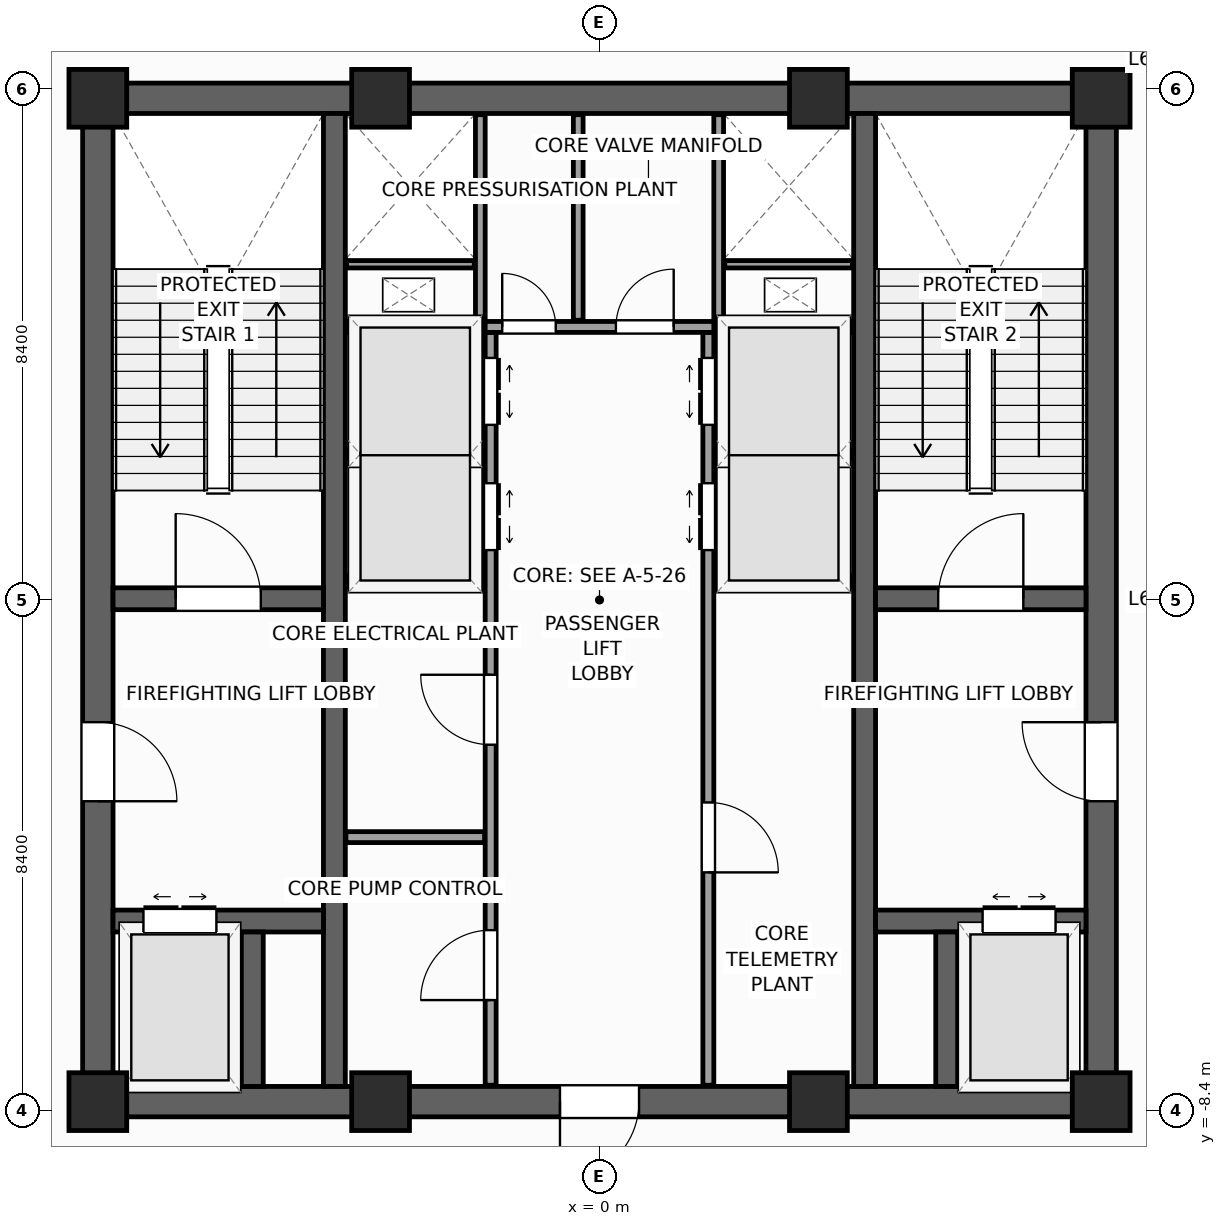
"""IFC4 building model, lengths in metres.
Left out: names, types, materials, properties, quantities, classifications, styles, units other than length and angle.
Written with IfcOpenShell. Run it as: python <this file> out.ifc"""

import sys

from ifc_helpers import new_model, si_unit, direction, frame, frame_2d, origin, origin_2d, place, context, subcontext, project, spatial, rectangle, extrude, source, transform, mapped, element, fill, save


model = new_model("IFC4")
c1 = context("Model", 3, precision=1e-05, world=origin(), true_north=direction((0.0, 1.0)))
c2 = subcontext(c1, "Body", "Model", "MODEL_VIEW")
j1 = project(units=[si_unit("LENGTHUNIT", "METRE"), si_unit("PLANEANGLEUNIT", "RADIAN")], contexts=[c1])
p1 = place(None, origin())
s1 = spatial("IfcSite", under=j1, at=p1, CompositionType="ELEMENT")
p2 = place(p1, origin())
s2 = spatial("IfcBuilding", under=s1, at=p2, CompositionType="ELEMENT")
p3 = place(p2, frame((0.0, 0.0, 260.2)))
s3 = spatial("IfcBuildingStorey", under=s2, at=p3, CompositionType="ELEMENT", Elevation=260.2)
p4 = place(p3, frame((-8.5, -8.25, 0.0), z_axis=(0.0, 0.0, 1.0), x_axis=(1.0, 0.0, 0.0)))
e1 = element("IfcWall", 1, at=p4, inside=s3, PredefinedType="SHEAR", context=c2, shape_type="SweptSolid", body=[
    extrude(rectangle(XDim=17.0, YDim=0.5, at=frame_2d((8.5, 0.0))), origin(), (0.0, 0.0, 1.0), 5.0),
])
p5 = place(p4, frame((7.85, 0.0, 0.0)))
e2 = element("IfcOpeningElement", 2, at=p5, cuts=e1, PredefinedType="OPENING", context=c2, shape_type="SweptSolid", body=[
    extrude(rectangle(XDim=1.3, YDim=2.2, at=frame_2d((0.65, 1.1))), frame((0.0, 0.26, 0.0), z_axis=(0.0, -1.0, 0.0), x_axis=(1.0, 0.0, 0.0)), (0.0, 0.0, 1.0), 0.52),
])
p6 = place(p3, frame((-8.5, 8.25, 0.0), z_axis=(0.0, 0.0, 1.0), x_axis=(1.0, 0.0, 0.0)))
e3 = element("IfcWall", 3, at=p6, inside=s3, PredefinedType="SHEAR", context=c2, shape_type="SweptSolid", body=[
    extrude(rectangle(XDim=17.0, YDim=0.5, at=frame_2d((8.5, 0.0))), origin(), (0.0, 0.0, 1.0), 5.0),
])
p7 = place(p3, frame((-8.25, -8.0, 0.0), z_axis=(0.0, 0.0, 1.0), x_axis=(0.0, 1.0, 0.0)))
e4 = element("IfcWall", 4, at=p7, inside=s3, PredefinedType="SHEAR", context=c2, shape_type="SweptSolid", body=[
    extrude(rectangle(XDim=16.0, YDim=0.5, at=frame_2d((8.0, 0.0))), origin(), (0.0, 0.0, 1.0), 5.0),
])
p8 = place(p7, frame((4.69, 0.0, 0.0)))
e5 = element("IfcOpeningElement", 5, at=p8, cuts=e4, PredefinedType="OPENING", context=c2, shape_type="SweptSolid", body=[
    extrude(rectangle(XDim=1.3, YDim=2.2, at=frame_2d((0.65, 1.1))), frame((0.0, 0.26, 0.0), z_axis=(0.0, -1.0, 0.0), x_axis=(1.0, 0.0, 0.0)), (0.0, 0.0, 1.0), 0.52),
])
p9 = place(p3, frame((8.25, -8.0, 0.0), z_axis=(0.0, 0.0, 1.0), x_axis=(0.0, 1.0, 0.0)))
e6 = element("IfcWall", 6, at=p9, inside=s3, PredefinedType="SHEAR", context=c2, shape_type="SweptSolid", body=[
    extrude(rectangle(XDim=16.0, YDim=0.5, at=frame_2d((8.0, 0.0))), origin(), (0.0, 0.0, 1.0), 5.0),
])
p10 = place(p9, frame((4.69, 0.0, 0.0)))
e7 = element("IfcOpeningElement", 7, at=p10, cuts=e6, PredefinedType="OPENING", context=c2, shape_type="SweptSolid", body=[
    extrude(rectangle(XDim=1.3, YDim=2.2, at=frame_2d((0.65, 1.1))), frame((0.0, 0.26, 0.0), z_axis=(0.0, -1.0, 0.0), x_axis=(1.0, 0.0, 0.0)), (0.0, 0.0, 1.0), 0.52),
])
for number, where, z_axis, x_axis in (
    (8, (-4.36, -8.0, 0.0), (0.0, 0.0, 1.0), (0.0, 1.0, 0.0)),
    (9, (4.36, -8.0, 0.0), (0.0, 0.0, 1.0), (0.0, 1.0, 0.0)),
):
    element("IfcWall", number, at=place(p3, frame(where, z_axis=z_axis, x_axis=x_axis)), inside=s3, PredefinedType="SHEAR", context=c2, shape_type="SweptSolid", body=[
        extrude(rectangle(XDim=16.0, YDim=0.36, at=frame_2d((8.0, 0.0))), origin(), (0.0, 0.0, 1.0), 5.0),
    ])
p11 = place(p3, frame((-8.0, 0.02, 0.0), z_axis=(0.0, 0.0, 1.0), x_axis=(1.0, 0.0, 0.0)))
e10 = element("IfcWall", 10, at=p11, inside=s3, PredefinedType="SHEAR", context=c2, shape_type="SweptSolid", body=[
    extrude(rectangle(XDim=3.46, YDim=0.36, at=frame_2d((1.73, 0.0))), origin(), (0.0, 0.0, 1.0), 5.0),
])
p12 = place(p11, frame((1.03, 0.0, 0.0)))
e11 = element("IfcOpeningElement", 11, at=p12, cuts=e10, PredefinedType="OPENING", context=c2, shape_type="SweptSolid", body=[
    extrude(rectangle(XDim=1.4, YDim=2.2, at=frame_2d((0.7, 1.1))), frame((0.0, 0.19, 0.0), z_axis=(0.0, -1.0, 0.0), x_axis=(1.0, 0.0, 0.0)), (0.0, 0.0, 1.0), 0.38),
])
p13 = place(p3, frame((4.54, 0.02, 0.0), z_axis=(0.0, 0.0, 1.0), x_axis=(1.0, 0.0, 0.0)))
e12 = element("IfcWall", 12, at=p13, inside=s3, PredefinedType="SHEAR", context=c2, shape_type="SweptSolid", body=[
    extrude(rectangle(XDim=3.46, YDim=0.36, at=frame_2d((1.73, 0.0))), origin(), (0.0, 0.0, 1.0), 5.0),
])
p14 = place(p13, frame((1.03, 0.0, 0.0)))
e13 = element("IfcOpeningElement", 13, at=p14, cuts=e12, PredefinedType="OPENING", context=c2, shape_type="SweptSolid", body=[
    extrude(rectangle(XDim=1.4, YDim=2.2, at=frame_2d((0.7, 1.1))), frame((0.0, 0.19, 0.0), z_axis=(0.0, -1.0, 0.0), x_axis=(1.0, 0.0, 0.0)), (0.0, 0.0, 1.0), 0.38),
])
p15 = place(p3, frame((-8.0, -5.28, 0.0), z_axis=(0.0, 0.0, 1.0), x_axis=(1.0, 0.0, 0.0)))
e14 = element("IfcWall", 14, at=p15, inside=s3, PredefinedType="SHEAR", context=c2, shape_type="SweptSolid", body=[
    extrude(rectangle(XDim=3.46, YDim=0.36, at=frame_2d((1.73, 0.0))), origin(), (0.0, 0.0, 1.0), 5.0),
])
p16 = place(p15, frame((0.5, 0.0, 0.0)))
e15 = element("IfcOpeningElement", 15, at=p16, cuts=e14, PredefinedType="OPENING", context=c2, shape_type="SweptSolid", body=[
    extrude(rectangle(XDim=1.2, YDim=2.25, at=frame_2d((0.6, 1.125))), frame((0.0, 0.19, 0.0), z_axis=(0.0, -1.0, 0.0), x_axis=(1.0, 0.0, 0.0)), (0.0, 0.0, 1.0), 0.38),
])
p17 = place(p3, frame((4.54, -5.28, 0.0), z_axis=(0.0, 0.0, 1.0), x_axis=(1.0, 0.0, 0.0)))
e16 = element("IfcWall", 16, at=p17, inside=s3, PredefinedType="SHEAR", context=c2, shape_type="SweptSolid", body=[
    extrude(rectangle(XDim=3.46, YDim=0.36, at=frame_2d((1.73, 0.0))), origin(), (0.0, 0.0, 1.0), 5.0),
])
p18 = place(p17, frame((1.76, 0.0, 0.0)))
e17 = element("IfcOpeningElement", 17, at=p18, cuts=e16, PredefinedType="OPENING", context=c2, shape_type="SweptSolid", body=[
    extrude(rectangle(XDim=1.2, YDim=2.25, at=frame_2d((0.6, 1.125))), frame((0.0, 0.19, 0.0), z_axis=(0.0, -1.0, 0.0), x_axis=(1.0, 0.0, 0.0)), (0.0, 0.0, 1.0), 0.38),
])
for number, where, z_axis, x_axis in (
    (18, (-5.71, -8.0, 0.0), (0.0, 0.0, 1.0), (0.0, 1.0, 0.0)),
    (19, (5.71, -8.0, 0.0), (0.0, 0.0, 1.0), (0.0, 1.0, 0.0)),
):
    element("IfcWall", number, at=place(p3, frame(where, z_axis=z_axis, x_axis=x_axis)), inside=s3, PredefinedType="SHEAR", context=c2, shape_type="SweptSolid", body=[
        extrude(rectangle(XDim=2.54, YDim=0.36, at=frame_2d((1.27, 0.0))), origin(), (0.0, 0.0, 1.0), 5.0),
    ])
m1 = source(origin(), c2, "Body", "SweptSolid", [
    extrude(rectangle(XDim=0.95, YDim=0.95, at=origin_2d()), origin(), (0.0, 0.0, 1.0), 5.0),
])
for number, where, z_axis, x_axis in (
    (20, (-8.25, -8.25, 0.0), (0.0, 0.0, 1.0), (1.0, 0.0, 0.0)),
    (21, (8.25, -8.25, 0.0), (0.0, 0.0, 1.0), (1.0, 0.0, 0.0)),
    (22, (8.25, 8.25, 0.0), (0.0, 0.0, 1.0), (1.0, 0.0, 0.0)),
    (23, (-8.25, 8.25, 0.0), (0.0, 0.0, 1.0), (1.0, 0.0, 0.0)),
    (24, (-3.6, -8.25, 0.0), (0.0, 0.0, 1.0), (1.0, 0.0, 0.0)),
    (25, (3.6, -8.25, 0.0), (0.0, 0.0, 1.0), (1.0, 0.0, 0.0)),
    (26, (-3.6, 8.25, 0.0), (0.0, 0.0, 1.0), (1.0, 0.0, 0.0)),
    (27, (3.6, 8.25, 0.0), (0.0, 0.0, 1.0), (1.0, 0.0, 0.0)),
):
    element("IfcColumn", number, at=place(p3, frame(where, z_axis=z_axis, x_axis=x_axis)), inside=s3, PredefinedType="PILASTER", context=c2, shape_type="MappedRepresentation", body=[
        mapped(m1, transform((0.0, 0.0, 0.0), scale=1.0)),
    ])
p19 = place(p3, frame((-1.79, -7.98, 0.0), z_axis=(0.0, 0.0, 1.0), x_axis=(0.0, 1.0, 0.0)))
e28 = element("IfcWall", 28, at=p19, inside=s3, PredefinedType="PARTITIONING", context=c2, shape_type="SweptSolid", body=[
    extrude(rectangle(XDim=12.38, YDim=0.18, at=frame_2d((6.19, 0.0))), origin(), (0.0, 0.0, 1.0), 4.75),
])
p20 = place(p19, frame((8.8, 0.0, 0.0)))
e29 = element("IfcOpeningElement", 29, at=p20, cuts=e28, PredefinedType="OPENING", context=c2, shape_type="SweptSolid", body=[
    extrude(rectangle(XDim=1.1, YDim=2.2, at=frame_2d((0.55, 1.1))), frame((0.0, 0.1, 0.0), z_axis=(0.0, -1.0, 0.0), x_axis=(1.0, 0.0, 0.0)), (0.0, 0.0, 1.0), 0.2),
])
p21 = place(p19, frame((10.86, 0.0, 0.0)))
e30 = element("IfcOpeningElement", 30, at=p21, cuts=e28, PredefinedType="OPENING", context=c2, shape_type="SweptSolid", body=[
    extrude(rectangle(XDim=1.1, YDim=2.2, at=frame_2d((0.55, 1.1))), frame((0.0, 0.1, 0.0), z_axis=(0.0, -1.0, 0.0), x_axis=(1.0, 0.0, 0.0)), (0.0, 0.0, 1.0), 0.2),
])
p22 = place(p19, frame((1.4, 0.0, 0.0)))
e31 = element("IfcOpeningElement", 31, at=p22, cuts=e28, PredefinedType="OPENING", context=c2, shape_type="SweptSolid", body=[
    extrude(rectangle(XDim=1.15, YDim=2.25, at=frame_2d((0.575, 1.125))), frame((0.0, 0.1, 0.0), z_axis=(0.0, -1.0, 0.0), x_axis=(1.0, 0.0, 0.0)), (0.0, 0.0, 1.0), 0.2),
])
p23 = place(p19, frame((5.6, 0.0, 0.0)))
e32 = element("IfcOpeningElement", 32, at=p23, cuts=e28, PredefinedType="OPENING", context=c2, shape_type="SweptSolid", body=[
    extrude(rectangle(XDim=1.15, YDim=2.25, at=frame_2d((0.575, 1.125))), frame((0.0, 0.1, 0.0), z_axis=(0.0, -1.0, 0.0), x_axis=(1.0, 0.0, 0.0)), (0.0, 0.0, 1.0), 0.2),
])
p24 = place(p3, frame((1.79, -7.98, 0.0), z_axis=(0.0, 0.0, 1.0), x_axis=(0.0, 1.0, 0.0)))
e33 = element("IfcWall", 33, at=p24, inside=s3, PredefinedType="PARTITIONING", context=c2, shape_type="SweptSolid", body=[
    extrude(rectangle(XDim=12.38, YDim=0.18, at=frame_2d((6.19, 0.0))), origin(), (0.0, 0.0, 1.0), 4.75),
])
p25 = place(p24, frame((8.8, 0.0, 0.0)))
e34 = element("IfcOpeningElement", 34, at=p25, cuts=e33, PredefinedType="OPENING", context=c2, shape_type="SweptSolid", body=[
    extrude(rectangle(XDim=1.1, YDim=2.2, at=frame_2d((0.55, 1.1))), frame((0.0, 0.1, 0.0), z_axis=(0.0, -1.0, 0.0), x_axis=(1.0, 0.0, 0.0)), (0.0, 0.0, 1.0), 0.2),
])
p26 = place(p24, frame((10.86, 0.0, 0.0)))
e35 = element("IfcOpeningElement", 35, at=p26, cuts=e33, PredefinedType="OPENING", context=c2, shape_type="SweptSolid", body=[
    extrude(rectangle(XDim=1.1, YDim=2.2, at=frame_2d((0.55, 1.1))), frame((0.0, 0.1, 0.0), z_axis=(0.0, -1.0, 0.0), x_axis=(1.0, 0.0, 0.0)), (0.0, 0.0, 1.0), 0.2),
])
p27 = place(p24, frame((3.5, 0.0, 0.0)))
e36 = element("IfcOpeningElement", 36, at=p27, cuts=e33, PredefinedType="OPENING", context=c2, shape_type="SweptSolid", body=[
    extrude(rectangle(XDim=1.15, YDim=2.25, at=frame_2d((0.575, 1.125))), frame((0.0, 0.1, 0.0), z_axis=(0.0, -1.0, 0.0), x_axis=(1.0, 0.0, 0.0)), (0.0, 0.0, 1.0), 0.2),
])
p28 = place(p3, frame((-1.88, 4.49, 0.0), z_axis=(0.0, 0.0, 1.0), x_axis=(1.0, 0.0, 0.0)))
e37 = element("IfcWall", 37, at=p28, inside=s3, PredefinedType="PARTITIONING", context=c2, shape_type="SweptSolid", body=[
    extrude(rectangle(XDim=3.76, YDim=0.18, at=frame_2d((1.88, 0.0))), origin(), (0.0, 0.0, 1.0), 4.75),
])
p29 = place(p28, frame((0.28, 0.0, 0.0)))
e38 = element("IfcOpeningElement", 38, at=p29, cuts=e37, PredefinedType="OPENING", context=c2, shape_type="SweptSolid", body=[
    extrude(rectangle(XDim=0.88, YDim=2.1, at=frame_2d((0.44, 1.05))), frame((0.0, 0.1, 0.0), z_axis=(0.0, -1.0, 0.0), x_axis=(1.0, 0.0, 0.0)), (0.0, 0.0, 1.0), 0.2),
])
p30 = place(p28, frame((2.15, 0.0, 0.0)))
e39 = element("IfcOpeningElement", 39, at=p30, cuts=e37, PredefinedType="OPENING", context=c2, shape_type="SweptSolid", body=[
    extrude(rectangle(XDim=0.95, YDim=2.1, at=frame_2d((0.475, 1.05))), frame((0.0, 0.1, 0.0), z_axis=(0.0, -1.0, 0.0), x_axis=(1.0, 0.0, 0.0)), (0.0, 0.0, 1.0), 0.2),
])
for number, where, z_axis, x_axis in (
    (40, (-4.17, -3.9, 0.0), (0.0, 0.0, 1.0), (1.0, 0.0, 0.0)),
    (41, (-4.17, 0.3, 0.0), (0.0, 0.0, 1.0), (1.0, 0.0, 0.0)),
    (42, (1.89, 0.3, 0.0), (0.0, 0.0, 1.0), (1.0, 0.0, 0.0)),
    (43, (-4.17, 4.49, 0.0), (0.0, 0.0, 1.0), (1.0, 0.0, 0.0)),
    (44, (1.89, 4.49, 0.0), (0.0, 0.0, 1.0), (1.0, 0.0, 0.0)),
):
    element("IfcWall", number, at=place(p3, frame(where, z_axis=z_axis, x_axis=x_axis)), inside=s3, PredefinedType="PARTITIONING", context=c2, shape_type="SweptSolid", body=[
        extrude(rectangle(XDim=2.28, YDim=0.18, at=frame_2d((1.14, 0.0))), origin(), (0.0, 0.0, 1.0), 4.75),
    ])
for number, where, z_axis, x_axis in (
    (45, (-4.16, 2.4, 0.0), (0.0, 0.0, 1.0), (1.0, 0.0, 0.0)),
    (46, (1.9, 2.4, 0.0), (0.0, 0.0, 1.0), (1.0, 0.0, 0.0)),
):
    element("IfcWall", number, at=place(p3, frame(where, z_axis=z_axis, x_axis=x_axis)), inside=s3, PredefinedType="PARTITIONING", context=c2, shape_type="SweptSolid", body=[
        extrude(rectangle(XDim=2.26, YDim=0.12, at=frame_2d((1.13, 0.0))), origin(), (0.0, 0.0, 1.0), 4.75),
    ])
for number, where, z_axis, x_axis in (
    (47, (-1.96, 4.58, 0.0), (0.0, 0.0, 1.0), (0.0, 1.0, 0.0)),
    (48, (1.96, 4.58, 0.0), (0.0, 0.0, 1.0), (0.0, 1.0, 0.0)),
):
    element("IfcWall", number, at=place(p3, frame(where, z_axis=z_axis, x_axis=x_axis)), inside=s3, PredefinedType="PARTITIONING", context=c2, shape_type="SweptSolid", body=[
        extrude(rectangle(XDim=3.4, YDim=0.16, at=frame_2d((1.7, 0.0))), origin(), (0.0, 0.0, 1.0), 4.75),
    ])
for number, where, z_axis, x_axis in (
    (49, (-4.16, 5.52, 0.0), (0.0, 0.0, 1.0), (1.0, 0.0, 0.0)),
    (50, (2.06, 5.52, 0.0), (0.0, 0.0, 1.0), (1.0, 0.0, 0.0)),
):
    element("IfcWall", number, at=place(p3, frame(where, z_axis=z_axis, x_axis=x_axis)), inside=s3, PredefinedType="PARTITIONING", context=c2, shape_type="SweptSolid", body=[
        extrude(rectangle(XDim=2.1, YDim=0.12, at=frame_2d((1.05, 0.0))), origin(), (0.0, 0.0, 1.0), 4.75),
    ])
p31 = place(p3, frame((-0.35, 4.6, 0.0), z_axis=(0.0, 0.0, 1.0), x_axis=(0.0, 1.0, 0.0)))
e51 = element("IfcWall", 51, at=p31, inside=s3, PredefinedType="PARTITIONING", context=c2, shape_type="SweptSolid", body=[
    extrude(rectangle(XDim=3.38, YDim=0.16, at=frame_2d((1.69, 0.0))), origin(), (0.0, 0.0, 1.0), 4.75),
])
m2 = source(origin(), c2, "Body", "SweptSolid", [
    extrude(rectangle(XDim=1.4, YDim=2.2, at=frame_2d((0.7, 1.1))), frame((0.0, 0.025, 0.0), z_axis=(0.0, -1.0, 0.0), x_axis=(1.0, 0.0, 0.0)), (0.0, 0.0, 1.0), 0.05),
])
p32 = place(p12, origin())
e52 = element("IfcDoor", 52, at=p32, inside=s3, OperationType="SINGLE_SWING_LEFT", PredefinedType="DOOR", context=c2, shape_type="MappedRepresentation", body=[
    mapped(m2, transform((0.0, 0.0, 0.0), scale=1.0)),
])
fill(e11, e52)
p33 = place(p14, origin())
e53 = element("IfcDoor", 53, at=p33, inside=s3, OperationType="SINGLE_SWING_RIGHT", PredefinedType="DOOR", context=c2, shape_type="MappedRepresentation", body=[
    mapped(m2, transform((0.0, 0.0, 0.0), scale=1.0)),
])
fill(e13, e53)
m3 = source(origin(), c2, "Body", "SweptSolid", [
    extrude(rectangle(XDim=1.3, YDim=2.2, at=frame_2d((0.65, 1.1))), frame((0.0, 0.025, 0.0), z_axis=(0.0, -1.0, 0.0), x_axis=(1.0, 0.0, 0.0)), (0.0, 0.0, 1.0), 0.05),
])
p34 = place(p8, frame((1.3, 0.0, 0.0), z_axis=(0.0, 0.0, 1.0), x_axis=(-1.0, 0.0, 0.0)))
e54 = element("IfcDoor", 54, at=p34, inside=s3, OperationType="SINGLE_SWING_LEFT", PredefinedType="DOOR", context=c2, shape_type="MappedRepresentation", body=[
    mapped(m3, transform((0.0, 0.0, 0.0), scale=1.0)),
])
fill(e5, e54)
p35 = place(p10, origin())
e55 = element("IfcDoor", 55, at=p35, inside=s3, OperationType="SINGLE_SWING_RIGHT", PredefinedType="DOOR", context=c2, shape_type="MappedRepresentation", body=[
    mapped(m3, transform((0.0, 0.0, 0.0), scale=1.0)),
])
fill(e7, e55)
p36 = place(p5, frame((1.3, 0.0, 0.0), z_axis=(0.0, 0.0, 1.0), x_axis=(-1.0, 0.0, 0.0)))
e56 = element("IfcDoor", 56, at=p36, inside=s3, OperationType="SINGLE_SWING_LEFT", PredefinedType="DOOR", context=c2, shape_type="MappedRepresentation", body=[
    mapped(m3, transform((0.0, 0.0, 0.0), scale=1.0)),
])
fill(e2, e56)
m4 = source(origin(), c2, "Body", "SweptSolid", [
    extrude(rectangle(XDim=1.2, YDim=2.25, at=frame_2d((0.6, 1.125))), frame((0.0, 0.025, 0.0), z_axis=(0.0, -1.0, 0.0), x_axis=(1.0, 0.0, 0.0)), (0.0, 0.0, 1.0), 0.05),
])
p37 = place(p16, origin())
e57 = element("IfcDoor", 57, at=p37, inside=s3, OperationType="DOUBLE_DOOR_SLIDING", PredefinedType="DOOR", context=c2, shape_type="MappedRepresentation", body=[
    mapped(m4, transform((0.0, 0.0, 0.0), scale=1.0)),
])
fill(e15, e57)
p38 = place(p18, origin())
e58 = element("IfcDoor", 58, at=p38, inside=s3, OperationType="DOUBLE_DOOR_SLIDING", PredefinedType="DOOR", context=c2, shape_type="MappedRepresentation", body=[
    mapped(m4, transform((0.0, 0.0, 0.0), scale=1.0)),
])
fill(e17, e58)
m5 = source(origin(), c2, "Body", "SweptSolid", [
    extrude(rectangle(XDim=1.1, YDim=2.2, at=frame_2d((0.55, 1.1))), frame((0.0, 0.025, 0.0), z_axis=(0.0, -1.0, 0.0), x_axis=(1.0, 0.0, 0.0)), (0.0, 0.0, 1.0), 0.05),
])
p39 = place(p20, frame((1.1, 0.0, 0.0), z_axis=(0.0, 0.0, 1.0), x_axis=(-1.0, 0.0, 0.0)))
e59 = element("IfcDoor", 59, at=p39, inside=s3, OperationType="DOUBLE_DOOR_SLIDING", PredefinedType="DOOR", context=c2, shape_type="MappedRepresentation", body=[
    mapped(m5, transform((0.0, 0.0, 0.0), scale=1.0)),
])
fill(e29, e59)
p40 = place(p21, frame((1.1, 0.0, 0.0), z_axis=(0.0, 0.0, 1.0), x_axis=(-1.0, 0.0, 0.0)))
e60 = element("IfcDoor", 60, at=p40, inside=s3, OperationType="DOUBLE_DOOR_SLIDING", PredefinedType="DOOR", context=c2, shape_type="MappedRepresentation", body=[
    mapped(m5, transform((0.0, 0.0, 0.0), scale=1.0)),
])
fill(e30, e60)
p41 = place(p25, origin())
e61 = element("IfcDoor", 61, at=p41, inside=s3, OperationType="DOUBLE_DOOR_SLIDING", PredefinedType="DOOR", context=c2, shape_type="MappedRepresentation", body=[
    mapped(m5, transform((0.0, 0.0, 0.0), scale=1.0)),
])
fill(e34, e61)
p42 = place(p26, origin())
e62 = element("IfcDoor", 62, at=p42, inside=s3, OperationType="DOUBLE_DOOR_SLIDING", PredefinedType="DOOR", context=c2, shape_type="MappedRepresentation", body=[
    mapped(m5, transform((0.0, 0.0, 0.0), scale=1.0)),
])
fill(e35, e62)
m6 = source(origin(), c2, "Body", "SweptSolid", [
    extrude(rectangle(XDim=1.15, YDim=2.25, at=frame_2d((0.575, 1.125))), frame((0.0, 0.025, 0.0), z_axis=(0.0, -1.0, 0.0), x_axis=(1.0, 0.0, 0.0)), (0.0, 0.0, 1.0), 0.05),
])
p43 = place(p22, origin())
e63 = element("IfcDoor", 63, at=p43, inside=s3, OperationType="SINGLE_SWING_LEFT", PredefinedType="DOOR", context=c2, shape_type="MappedRepresentation", body=[
    mapped(m6, transform((0.0, 0.0, 0.0), scale=1.0)),
])
fill(e31, e63)
p44 = place(p23, origin())
e64 = element("IfcDoor", 64, at=p44, inside=s3, OperationType="SINGLE_SWING_RIGHT", PredefinedType="DOOR", context=c2, shape_type="MappedRepresentation", body=[
    mapped(m6, transform((0.0, 0.0, 0.0), scale=1.0)),
])
fill(e32, e64)
p45 = place(p27, frame((1.15, 0.0, 0.0), z_axis=(0.0, 0.0, 1.0), x_axis=(-1.0, 0.0, 0.0)))
e65 = element("IfcDoor", 65, at=p45, inside=s3, OperationType="SINGLE_SWING_LEFT", PredefinedType="DOOR", context=c2, shape_type="MappedRepresentation", body=[
    mapped(m6, transform((0.0, 0.0, 0.0), scale=1.0)),
])
fill(e36, e65)
m7 = source(origin(), c2, "Body", "SweptSolid", [
    extrude(rectangle(XDim=0.88, YDim=2.1, at=frame_2d((0.44, 1.05))), frame((0.0, 0.025, 0.0), z_axis=(0.0, -1.0, 0.0), x_axis=(1.0, 0.0, 0.0)), (0.0, 0.0, 1.0), 0.05),
])
p46 = place(p29, origin())
e66 = element("IfcDoor", 66, at=p46, inside=s3, OperationType="SINGLE_SWING_LEFT", PredefinedType="DOOR", context=c2, shape_type="MappedRepresentation", body=[
    mapped(m7, transform((0.0, 0.0, 0.0), scale=1.0)),
])
fill(e38, e66)
m8 = source(origin(), c2, "Body", "SweptSolid", [
    extrude(rectangle(XDim=0.95, YDim=2.1, at=frame_2d((0.475, 1.05))), frame((0.0, 0.025, 0.0), z_axis=(0.0, -1.0, 0.0), x_axis=(1.0, 0.0, 0.0)), (0.0, 0.0, 1.0), 0.05),
])
p47 = place(p30, origin())
e67 = element("IfcDoor", 67, at=p47, inside=s3, OperationType="SINGLE_SWING_RIGHT", PredefinedType="DOOR", context=c2, shape_type="MappedRepresentation", body=[
    mapped(m8, transform((0.0, 0.0, 0.0), scale=1.0)),
])
fill(e39, e67)
save(model, sys.argv[1])
